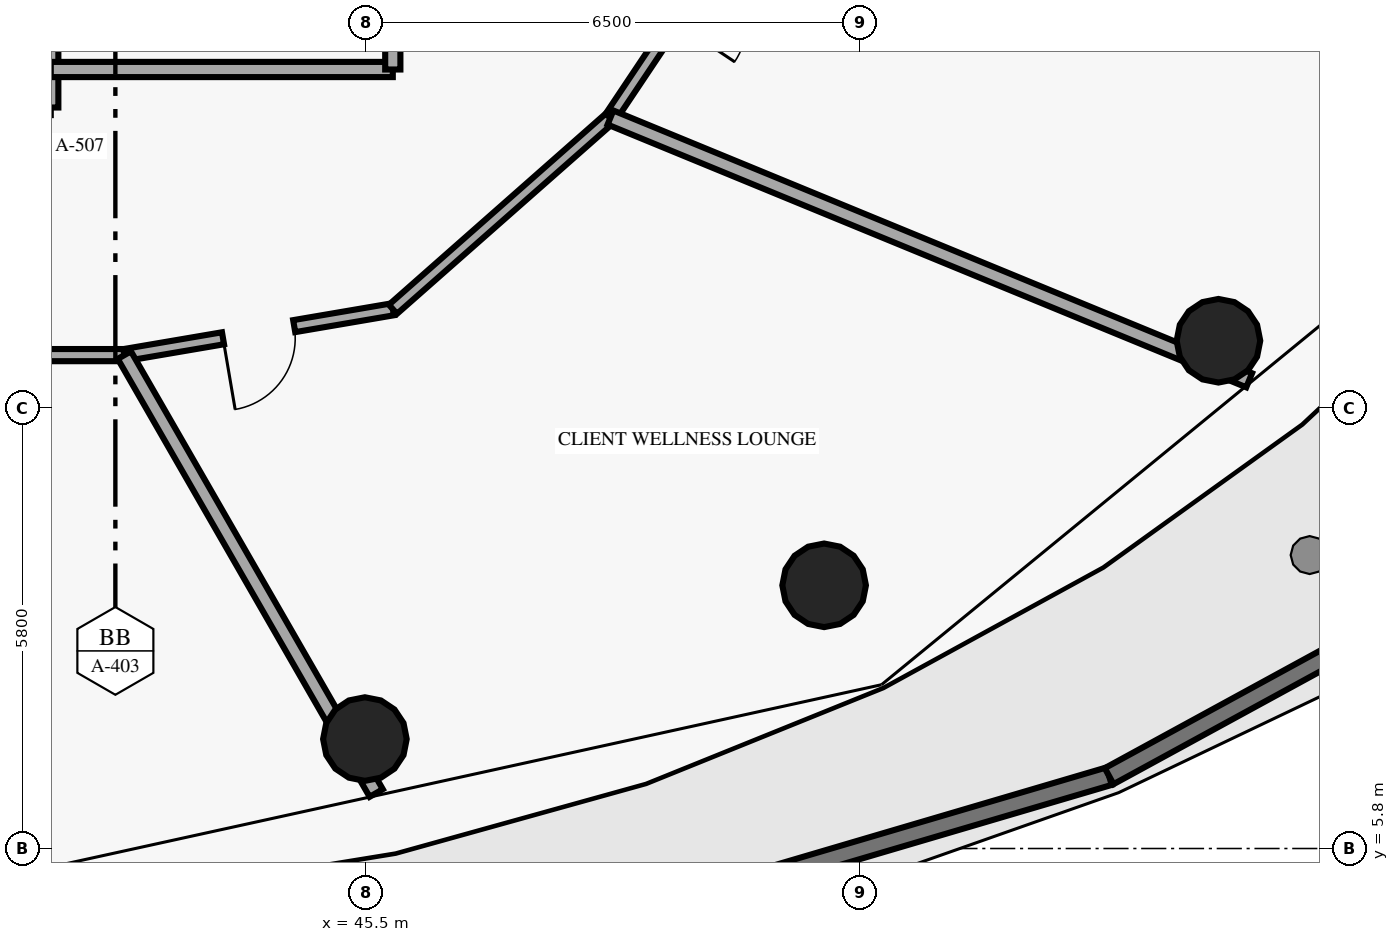
"""IFC4 building model, lengths in metres.
Left out: names, types, materials, properties, quantities, classifications, styles, units other than length and angle.
Written with IfcOpenShell. Run it as: python <this file> out.ifc"""

import sys

from ifc_helpers import new_model, si_unit, direction, frame, frame_2d, origin, origin_2d, place, context, subcontext, project, spatial, rectangle, circle, extrude, element, fill, save


model = new_model("IFC4")
c1 = context("Model", 3, precision=1e-05, world=origin(), true_north=direction((0.0, 1.0)))
c2 = subcontext(c1, "Body", "Model", "MODEL_VIEW")
j1 = project(units=[si_unit("LENGTHUNIT", "METRE"), si_unit("PLANEANGLEUNIT", "RADIAN")], contexts=[c1])
p1 = place(None, origin())
s1 = spatial("IfcSite", under=j1, at=p1, CompositionType="ELEMENT")
p2 = place(p1, origin())
s2 = spatial("IfcBuilding", under=s1, at=p2, CompositionType="ELEMENT")
p3 = place(p2, frame((0.0, 0.0, 21.0)))
s3 = spatial("IfcBuildingStorey", under=s2, at=p3, CompositionType="ELEMENT", Elevation=21.0)
for number, where, z_axis, x_axis in (
    (1, (45.483, 7.24, -0.26), (0.0, 0.0, 1.0), (1.0, 0.0, 0.0)),
    (2, (51.525, 9.263, -0.26), (0.0, 0.0, 1.0), (1.0, 0.0, 0.0)),
):
    element("IfcColumn", number, at=place(p3, frame(where, z_axis=z_axis, x_axis=x_axis)), inside=s3, PredefinedType="COLUMN", context=c2, shape_type="SweptSolid", body=[
        extrude(circle(Radius=0.55, at=origin_2d()), origin(), (0.0, 0.0, 1.0), 4.05),
    ])
p4 = place(p3, frame((56.713, 12.481, 0.0), z_axis=(0.0, 0.0, 1.0), x_axis=(1.0, 0.0, 0.0)))
e3 = element("IfcColumn", 3, at=p4, inside=s3, PredefinedType="COLUMN", context=c2, shape_type="SweptSolid", body=[
    extrude(circle(Radius=0.55, at=origin_2d()), origin(), (0.0, 0.0, 1.0), 3.79),
])
p5 = place(p3, frame((47.425, 4.439, 0.0), z_axis=(0.0, 0.0, 1.0), x_axis=(0.959226195017, 0.282639535085, 0.0)))
e4 = element("IfcWall", 4, at=p5, inside=s3, PredefinedType="PARAPET", context=c2, shape_type="SweptSolid", body=[
    extrude(rectangle(XDim=8.184, YDim=0.24, at=frame_2d((4.092, 0.0))), origin(), (0.0, 0.0, 1.0), 1.15),
])
p6 = place(p3, frame((55.275, 6.752, 0.0), z_axis=(0.0, 0.0, 1.0), x_axis=(0.877843323355, 0.47894790911, 0.0)))
e5 = element("IfcWall", 5, at=p6, inside=s3, PredefinedType="PARAPET", context=c2, shape_type="SweptSolid", body=[
    extrude(rectangle(XDim=7.679, YDim=0.24, at=frame_2d((3.84, 0.0))), origin(), (0.0, 0.0, 1.0), 1.15),
])
p7 = place(p3, frame((41.35, 15.55, 0.0), z_axis=(0.0, 0.0, 1.0), x_axis=(0.0, 1.0, 0.0)))
e6 = element("IfcWall", 6, at=p7, inside=s3, PredefinedType="SOLIDWALL", context=c2, shape_type="SweptSolid", body=[
    extrude(rectangle(XDim=2.8, YDim=0.2, at=frame_2d((1.4, 0.0))), origin(), (0.0, 0.0, 1.0), 3.79),
])
p8 = place(p7, frame((0.9, 0.0, 0.0)))
e7 = element("IfcOpeningElement", 7, at=p8, cuts=e6, PredefinedType="OPENING", context=c2, shape_type="SweptSolid", body=[
    extrude(rectangle(XDim=1.1, YDim=2.15, at=frame_2d((0.55, 1.075))), frame((0.0, 0.11, 0.0), z_axis=(0.0, -1.0, 0.0), x_axis=(1.0, 0.0, 0.0)), (0.0, 0.0, 1.0), 0.22),
])
p9 = place(p3, frame((41.35, 16.05, 0.0), z_axis=(0.0, 0.0, 1.0), x_axis=(1.0, 0.0, 0.0)))
e8 = element("IfcWall", 8, at=p9, inside=s3, PredefinedType="SOLIDWALL", context=c2, shape_type="SweptSolid", body=[
    extrude(rectangle(XDim=4.5, YDim=0.2, at=frame_2d((2.25, 0.0))), origin(), (0.0, 0.0, 1.0), 3.79),
])
p10 = place(p3, frame((45.85, 16.05, 0.0), z_axis=(0.0, 0.0, 1.0), x_axis=(0.0, 1.0, 0.0)))
e9 = element("IfcWall", 9, at=p10, inside=s3, PredefinedType="SOLIDWALL", context=c2, shape_type="SweptSolid", body=[
    extrude(rectangle(XDim=2.3, YDim=0.2, at=frame_2d((1.15, 0.0))), origin(), (0.0, 0.0, 1.0), 3.79),
])
p11 = place(p3, frame((35.682, 12.292, 0.0), z_axis=(0.0, 0.0, 1.0), x_axis=(1.0, 0.0, 0.0)))
e10 = element("IfcWall", 10, at=p11, inside=s3, PredefinedType="PARTITIONING", context=c2, shape_type="SweptSolid", body=[
    extrude(rectangle(XDim=6.636, YDim=0.16, at=frame_2d((3.318, 0.0))), origin(), (0.0, 0.0, 1.0), 3.79),
])
p12 = place(p3, frame((45.852, 12.895, 0.0), z_axis=(0.0, 0.0, 1.0), x_axis=(-0.985751576779, -0.168207695658, 0.0)))
e11 = element("IfcWall", 11, at=p12, inside=s3, PredefinedType="PARTITIONING", context=c2, shape_type="SweptSolid", body=[
    extrude(rectangle(XDim=3.585, YDim=0.16, at=frame_2d((1.792, 0.0))), origin(), (0.0, 0.0, 1.0), 3.79),
])
p13 = place(p12, frame((1.318, 0.0, 0.0)))
e12 = element("IfcOpeningElement", 12, at=p13, cuts=e11, PredefinedType="OPENING", context=c2, shape_type="SweptSolid", body=[
    extrude(rectangle(XDim=0.95, YDim=2.15, at=frame_2d((0.475, 1.075))), frame((0.0, 0.09, 0.0), z_axis=(0.0, -1.0, 0.0), x_axis=(1.0, 0.0, 0.0)), (0.0, 0.0, 1.0), 0.18),
])
p14 = place(p3, frame((45.852, 12.895, 0.0), z_axis=(0.0, 0.0, 1.0), x_axis=(0.75014962781, 0.661268127083, 0.0)))
e13 = element("IfcWall", 13, at=p14, inside=s3, PredefinedType="PARTITIONING", context=c2, shape_type="SweptSolid", body=[
    extrude(rectangle(XDim=3.815, YDim=0.16, at=frame_2d((1.908, 0.0))), origin(), (0.0, 0.0, 1.0), 3.79),
])
p15 = place(p3, frame((50.93, 18.73, 0.0), z_axis=(0.0, 0.0, 1.0), x_axis=(-0.556056751682, -0.831144324958, 0.0)))
e14 = element("IfcWall", 14, at=p15, inside=s3, PredefinedType="PARTITIONING", context=c2, shape_type="SweptSolid", body=[
    extrude(rectangle(XDim=3.985, YDim=0.16, at=frame_2d((1.992, 0.0))), origin(), (0.0, 0.0, 1.0), 3.79),
])
p16 = place(p15, frame((1.517, 0.0, 0.0)))
e15 = element("IfcOpeningElement", 15, at=p16, cuts=e14, PredefinedType="OPENING", context=c2, shape_type="SweptSolid", body=[
    extrude(rectangle(XDim=0.95, YDim=2.15, at=frame_2d((0.475, 1.075))), frame((0.0, 0.09, 0.0), z_axis=(0.0, -1.0, 0.0), x_axis=(1.0, 0.0, 0.0)), (0.0, 0.0, 1.0), 0.18),
])
p17 = place(p3, frame((42.318, 12.292, 0.0), z_axis=(0.0, 0.0, 1.0), x_axis=(0.498565662125, -0.866851936925, 0.0)))
e16 = element("IfcWall", 16, at=p17, inside=s3, PredefinedType="PARTITIONING", context=c2, shape_type="SweptSolid", body=[
    extrude(rectangle(XDim=6.647, YDim=0.2, at=frame_2d((3.323, 0.0))), origin(), (0.0, 0.0, 1.0), 3.79),
])
p18 = place(p3, frame((48.714, 15.418, 0.0), z_axis=(0.0, 0.0, 1.0), x_axis=(0.924792688949, -0.38047139507, 0.0)))
e17 = element("IfcWall", 17, at=p18, inside=s3, PredefinedType="PARTITIONING", context=c2, shape_type="SweptSolid", body=[
    extrude(rectangle(XDim=9.086, YDim=0.2, at=frame_2d((4.543, 0.0))), origin(), (0.0, 0.0, 1.0), 3.79),
])
p19 = place(p13, origin())
e18 = element("IfcDoor", 18, at=p19, inside=s3, OperationType="SINGLE_SWING_RIGHT", PredefinedType="DOOR", context=c2, shape_type="SweptSolid", body=[
    extrude(rectangle(XDim=0.95, YDim=2.15, at=frame_2d((0.475, 1.075))), frame((0.0, 0.025, 0.0), z_axis=(0.0, -1.0, 0.0), x_axis=(1.0, 0.0, 0.0)), (0.0, 0.0, 1.0), 0.05),
])
fill(e12, e18)
save(model, sys.argv[1])
